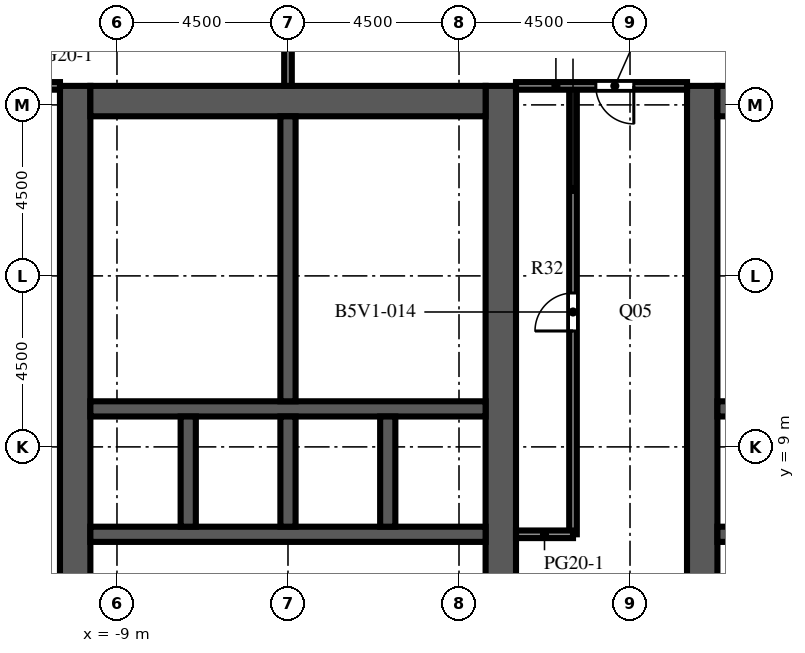
"""IFC4 building model, lengths in metres.
Left out: names, types, materials, properties, quantities, classifications, styles, units other than length and angle.
Written with IfcOpenShell. Run it as: python <this file> out.ifc"""

import sys

from ifc_helpers import new_model, si_unit, direction, frame, frame_2d, origin, place, context, subcontext, project, spatial, rectangle, extrude, element, fill, save


model = new_model("IFC4")
c1 = context("Model", 3, precision=1e-05, world=origin(), true_north=direction((0.0, 1.0)))
c2 = subcontext(c1, "Body", "Model", "MODEL_VIEW")
j1 = project(units=[si_unit("LENGTHUNIT", "METRE"), si_unit("PLANEANGLEUNIT", "RADIAN")], contexts=[c1])
p1 = place(None, origin())
s1 = spatial("IfcSite", under=j1, at=p1, CompositionType="ELEMENT")
p2 = place(p1, origin())
s2 = spatial("IfcBuilding", under=s1, at=p2, CompositionType="ELEMENT")
p3 = place(p2, frame((0.0, 0.0, 169.1)))
s3 = spatial("IfcBuildingStorey", under=s2, at=p3, CompositionType="ELEMENT", Elevation=169.1)
p4 = place(p3, frame((-10.1, -9.0, 0.0), z_axis=(0.0, 0.0, 1.0), x_axis=(0.0, 1.0, 0.0)))
e1 = element("IfcWall", 1, at=p4, inside=s3, PredefinedType="SHEAR", context=c2, shape_type="SweptSolid", body=[
    extrude(rectangle(XDim=27.5, YDim=0.8, at=frame_2d((13.75, 0.0))), origin(), (0.0, 0.0, 1.0), 4.1),
])
p5 = place(p4, frame((12.55, 0.0, 0.0)))
e2 = element("IfcOpeningElement", 2, at=p5, cuts=e1, PredefinedType="OPENING", context=c2, shape_type="SweptSolid", body=[
    extrude(rectangle(XDim=2.4, YDim=2.4, at=frame_2d((1.2, 1.2))), frame((0.0, 0.41, 0.0), z_axis=(0.0, -1.0, 0.0), x_axis=(1.0, 0.0, 0.0)), (0.0, 0.0, 1.0), 0.82),
])
p6 = place(p4, frame((6.825, 0.0, 0.0)))
e3 = element("IfcOpeningElement", 3, at=p6, cuts=e1, PredefinedType="OPENING", context=c2, shape_type="SweptSolid", body=[
    extrude(rectangle(XDim=1.2, YDim=2.1, at=frame_2d((0.6, 1.05))), frame((0.0, 0.41, 0.0), z_axis=(0.0, -1.0, 0.0), x_axis=(1.0, 0.0, 0.0)), (0.0, 0.0, 1.0), 0.82),
])
p7 = place(p4, frame((19.475, 0.0, 0.0)))
e4 = element("IfcOpeningElement", 4, at=p7, cuts=e1, PredefinedType="OPENING", context=c2, shape_type="SweptSolid", body=[
    extrude(rectangle(XDim=1.2, YDim=2.1, at=frame_2d((0.6, 1.05))), frame((0.0, 0.41, 0.0), z_axis=(0.0, -1.0, 0.0), x_axis=(1.0, 0.0, 0.0)), (0.0, 0.0, 1.0), 0.82),
])
p8 = place(p3, frame((1.1, -9.0, 0.0), z_axis=(0.0, 0.0, 1.0), x_axis=(0.0, 1.0, 0.0)))
e5 = element("IfcWall", 5, at=p8, inside=s3, PredefinedType="SHEAR", context=c2, shape_type="SweptSolid", body=[
    extrude(rectangle(XDim=27.5, YDim=0.8, at=frame_2d((13.75, 0.0))), origin(), (0.0, 0.0, 1.0), 4.1),
])
p9 = place(p8, frame((12.55, 0.0, 0.0)))
e6 = element("IfcOpeningElement", 6, at=p9, cuts=e5, PredefinedType="OPENING", context=c2, shape_type="SweptSolid", body=[
    extrude(rectangle(XDim=2.4, YDim=2.4, at=frame_2d((1.2, 1.2))), frame((0.0, 0.41, 0.0), z_axis=(0.0, -1.0, 0.0), x_axis=(1.0, 0.0, 0.0)), (0.0, 0.0, 1.0), 0.82),
])
p10 = place(p8, frame((3.95, 0.0, 0.0)))
e7 = element("IfcOpeningElement", 7, at=p10, cuts=e5, PredefinedType="OPENING", context=c2, shape_type="SweptSolid", body=[
    extrude(rectangle(XDim=1.2, YDim=2.1, at=frame_2d((0.6, 1.05))), frame((0.0, 0.41, 0.0), z_axis=(0.0, -1.0, 0.0), x_axis=(1.0, 0.0, 0.0)), (0.0, 0.0, 1.0), 0.82),
])
p11 = place(p8, frame((22.35, 0.0, 0.0)))
e8 = element("IfcOpeningElement", 8, at=p11, cuts=e5, PredefinedType="OPENING", context=c2, shape_type="SweptSolid", body=[
    extrude(rectangle(XDim=1.2, YDim=2.1, at=frame_2d((0.6, 1.05))), frame((0.0, 0.41, 0.0), z_axis=(0.0, -1.0, 0.0), x_axis=(1.0, 0.0, 0.0)), (0.0, 0.0, 1.0), 0.82),
])
p12 = place(p3, frame((-9.7, 18.1, 0.0), z_axis=(0.0, 0.0, 1.0), x_axis=(1.0, 0.0, 0.0)))
e9 = element("IfcWall", 9, at=p12, inside=s3, PredefinedType="SHEAR", context=c2, shape_type="SweptSolid", body=[
    extrude(rectangle(XDim=10.4, YDim=0.8, at=frame_2d((5.2, 0.0))), origin(), (0.0, 0.0, 1.0), 4.1),
])
p13 = place(p3, frame((-9.7, 6.7, 0.0), z_axis=(0.0, 0.0, 1.0), x_axis=(1.0, 0.0, 0.0)))
e10 = element("IfcWall", 10, at=p13, inside=s3, PredefinedType="SHEAR", context=c2, shape_type="SweptSolid", body=[
    extrude(rectangle(XDim=10.4, YDim=0.4, at=frame_2d((5.2, 0.0))), origin(), (0.0, 0.0, 1.0), 4.1),
])
p14 = place(p13, frame((3.337, 0.0, 0.0)))
e11 = element("IfcOpeningElement", 11, at=p14, cuts=e10, PredefinedType="OPENING", context=c2, shape_type="SweptSolid", body=[
    extrude(rectangle(XDim=1.1, YDim=2.1, at=frame_2d((0.55, 1.05))), frame((0.0, 0.21, 0.0), z_axis=(0.0, -1.0, 0.0), x_axis=(1.0, 0.0, 0.0)), (0.0, 0.0, 1.0), 0.42),
])
p15 = place(p13, frame((5.962, 0.0, 0.0)))
e12 = element("IfcOpeningElement", 12, at=p15, cuts=e10, PredefinedType="OPENING", context=c2, shape_type="SweptSolid", body=[
    extrude(rectangle(XDim=1.1, YDim=2.1, at=frame_2d((0.55, 1.05))), frame((0.0, 0.21, 0.0), z_axis=(0.0, -1.0, 0.0), x_axis=(1.0, 0.0, 0.0)), (0.0, 0.0, 1.0), 0.42),
])
p16 = place(p13, frame((8.663, 0.0, 0.0)))
e13 = element("IfcOpeningElement", 13, at=p16, cuts=e10, PredefinedType="OPENING", context=c2, shape_type="SweptSolid", body=[
    extrude(rectangle(XDim=1.1, YDim=2.1, at=frame_2d((0.55, 1.05))), frame((0.0, 0.21, 0.0), z_axis=(0.0, -1.0, 0.0), x_axis=(1.0, 0.0, 0.0)), (0.0, 0.0, 1.0), 0.42),
])
p17 = place(p13, frame((0.688, 0.0, 0.0)))
e14 = element("IfcOpeningElement", 14, at=p17, cuts=e10, PredefinedType="OPENING", context=c2, shape_type="SweptSolid", body=[
    extrude(rectangle(XDim=1.0, YDim=2.1, at=frame_2d((0.5, 1.05))), frame((0.0, 0.21, 0.0), z_axis=(0.0, -1.0, 0.0), x_axis=(1.0, 0.0, 0.0)), (0.0, 0.0, 1.0), 0.42),
])
p18 = place(p3, frame((-9.7, 10.0, 0.0), z_axis=(0.0, 0.0, 1.0), x_axis=(1.0, 0.0, 0.0)))
e15 = element("IfcWall", 15, at=p18, inside=s3, PredefinedType="SHEAR", context=c2, shape_type="SweptSolid", body=[
    extrude(rectangle(XDim=10.4, YDim=0.4, at=frame_2d((5.2, 0.0))), origin(), (0.0, 0.0, 1.0), 4.1),
])
for number, where, z_axis, x_axis in (
    (16, (-7.125, 6.9, 0.0), (0.0, 0.0, 1.0), (0.0, 1.0, 0.0)),
    (17, (-4.5, 6.9, 0.0), (0.0, 0.0, 1.0), (0.0, 1.0, 0.0)),
    (18, (-1.875, 6.9, 0.0), (0.0, 0.0, 1.0), (0.0, 1.0, 0.0)),
):
    element("IfcWall", number, at=place(p3, frame(where, z_axis=z_axis, x_axis=x_axis)), inside=s3, PredefinedType="SHEAR", context=c2, shape_type="SweptSolid", body=[
        extrude(rectangle(XDim=2.9, YDim=0.4, at=frame_2d((1.45, 0.0))), origin(), (0.0, 0.0, 1.0), 4.1),
    ])
p19 = place(p3, frame((-4.5, 10.2, 0.0), z_axis=(0.0, 0.0, 1.0), x_axis=(0.0, 1.0, 0.0)))
e19 = element("IfcWall", 19, at=p19, inside=s3, PredefinedType="SHEAR", context=c2, shape_type="SweptSolid", body=[
    extrude(rectangle(XDim=7.5, YDim=0.4, at=frame_2d((3.75, 0.0))), origin(), (0.0, 0.0, 1.0), 4.1),
])
p20 = place(p3, frame((6.4, -9.0, 0.0), z_axis=(0.0, 0.0, 1.0), x_axis=(0.0, 1.0, 0.0)))
e20 = element("IfcWall", 20, at=p20, inside=s3, PredefinedType="SHEAR", context=c2, shape_type="SweptSolid", body=[
    extrude(rectangle(XDim=27.5, YDim=0.8, at=frame_2d((13.75, 0.0))), origin(), (0.0, 0.0, 1.0), 4.1),
])
p21 = place(p20, frame((12.55, 0.0, 0.0)))
e21 = element("IfcOpeningElement", 21, at=p21, cuts=e20, PredefinedType="OPENING", context=c2, shape_type="SweptSolid", body=[
    extrude(rectangle(XDim=2.4, YDim=2.4, at=frame_2d((1.2, 1.2))), frame((0.0, 0.41, 0.0), z_axis=(0.0, -1.0, 0.0), x_axis=(1.0, 0.0, 0.0)), (0.0, 0.0, 1.0), 0.82),
])
p22 = place(p20, frame((3.95, 0.0, 0.0)))
e22 = element("IfcOpeningElement", 22, at=p22, cuts=e20, PredefinedType="OPENING", context=c2, shape_type="SweptSolid", body=[
    extrude(rectangle(XDim=1.2, YDim=2.1, at=frame_2d((0.6, 1.05))), frame((0.0, 0.41, 0.0), z_axis=(0.0, -1.0, 0.0), x_axis=(1.0, 0.0, 0.0)), (0.0, 0.0, 1.0), 0.82),
])
p23 = place(p20, frame((22.35, 0.0, 0.0)))
e23 = element("IfcOpeningElement", 23, at=p23, cuts=e20, PredefinedType="OPENING", context=c2, shape_type="SweptSolid", body=[
    extrude(rectangle(XDim=1.2, YDim=2.1, at=frame_2d((0.6, 1.05))), frame((0.0, 0.41, 0.0), z_axis=(0.0, -1.0, 0.0), x_axis=(1.0, 0.0, 0.0)), (0.0, 0.0, 1.0), 0.82),
])
p24 = place(p3, frame((6.8, 18.1, 0.0), z_axis=(0.0, 0.0, 1.0), x_axis=(1.0, 0.0, 0.0)))
e24 = element("IfcWall", 24, at=p24, inside=s3, PredefinedType="SHEAR", context=c2, shape_type="SweptSolid", body=[
    extrude(rectangle(XDim=10.4, YDim=0.8, at=frame_2d((5.2, 0.0))), origin(), (0.0, 0.0, 1.0), 4.1),
])
p25 = place(p3, frame((6.8, 6.7, 0.0), z_axis=(0.0, 0.0, 1.0), x_axis=(1.0, 0.0, 0.0)))
e25 = element("IfcWall", 25, at=p25, inside=s3, PredefinedType="SHEAR", context=c2, shape_type="SweptSolid", body=[
    extrude(rectangle(XDim=10.4, YDim=0.4, at=frame_2d((5.2, 0.0))), origin(), (0.0, 0.0, 1.0), 4.1),
])
p26 = place(p25, frame((3.337, 0.0, 0.0)))
e26 = element("IfcOpeningElement", 26, at=p26, cuts=e25, PredefinedType="OPENING", context=c2, shape_type="SweptSolid", body=[
    extrude(rectangle(XDim=1.1, YDim=2.1, at=frame_2d((0.55, 1.05))), frame((0.0, 0.21, 0.0), z_axis=(0.0, -1.0, 0.0), x_axis=(1.0, 0.0, 0.0)), (0.0, 0.0, 1.0), 0.42),
])
p27 = place(p25, frame((5.962, 0.0, 0.0)))
e27 = element("IfcOpeningElement", 27, at=p27, cuts=e25, PredefinedType="OPENING", context=c2, shape_type="SweptSolid", body=[
    extrude(rectangle(XDim=1.1, YDim=2.1, at=frame_2d((0.55, 1.05))), frame((0.0, 0.21, 0.0), z_axis=(0.0, -1.0, 0.0), x_axis=(1.0, 0.0, 0.0)), (0.0, 0.0, 1.0), 0.42),
])
p28 = place(p25, frame((8.663, 0.0, 0.0)))
e28 = element("IfcOpeningElement", 28, at=p28, cuts=e25, PredefinedType="OPENING", context=c2, shape_type="SweptSolid", body=[
    extrude(rectangle(XDim=1.1, YDim=2.1, at=frame_2d((0.55, 1.05))), frame((0.0, 0.21, 0.0), z_axis=(0.0, -1.0, 0.0), x_axis=(1.0, 0.0, 0.0)), (0.0, 0.0, 1.0), 0.42),
])
p29 = place(p25, frame((0.688, 0.0, 0.0)))
e29 = element("IfcOpeningElement", 29, at=p29, cuts=e25, PredefinedType="OPENING", context=c2, shape_type="SweptSolid", body=[
    extrude(rectangle(XDim=1.0, YDim=2.1, at=frame_2d((0.5, 1.05))), frame((0.0, 0.21, 0.0), z_axis=(0.0, -1.0, 0.0), x_axis=(1.0, 0.0, 0.0)), (0.0, 0.0, 1.0), 0.42),
])
p30 = place(p3, frame((6.8, 10.0, 0.0), z_axis=(0.0, 0.0, 1.0), x_axis=(1.0, 0.0, 0.0)))
e30 = element("IfcWall", 30, at=p30, inside=s3, PredefinedType="SHEAR", context=c2, shape_type="SweptSolid", body=[
    extrude(rectangle(XDim=10.4, YDim=0.4, at=frame_2d((5.2, 0.0))), origin(), (0.0, 0.0, 1.0), 4.1),
])
p31 = place(p3, frame((-0.7, 10.2, 0.0), z_axis=(0.0, 0.0, 1.0), x_axis=(0.0, 1.0, 0.0)))
e31 = element("IfcWall", 31, at=p31, inside=s3, PredefinedType="PARTITIONING", context=c2, shape_type="SweptSolid", body=[
    extrude(rectangle(XDim=2.25, YDim=0.1, at=frame_2d((1.125, 0.0))), origin(), (0.0, 0.0, 1.0), 3.65),
])
p32 = place(p31, frame((0.625, 0.0, 0.0)))
e32 = element("IfcOpeningElement", 32, at=p32, cuts=e31, PredefinedType="OPENING", context=c2, shape_type="SweptSolid", body=[
    extrude(rectangle(XDim=1.0, YDim=2.1, at=frame_2d((0.5, 1.05))), frame((0.0, 0.06, 0.0), z_axis=(0.0, -1.0, 0.0), x_axis=(1.0, 0.0, 0.0)), (0.0, 0.0, 1.0), 0.12),
])
p33 = place(p3, frame((-0.7, 12.45, 0.0), z_axis=(0.0, 0.0, 1.0), x_axis=(0.0, 1.0, 0.0)))
e33 = element("IfcWall", 33, at=p33, inside=s3, PredefinedType="PARTITIONING", context=c2, shape_type="SweptSolid", body=[
    extrude(rectangle(XDim=2.4, YDim=0.1, at=frame_2d((1.2, 0.0))), origin(), (0.0, 0.0, 1.0), 3.65),
])
p34 = place(p33, frame((0.7, 0.0, 0.0)))
e34 = element("IfcOpeningElement", 34, at=p34, cuts=e33, PredefinedType="OPENING", context=c2, shape_type="SweptSolid", body=[
    extrude(rectangle(XDim=1.0, YDim=2.1, at=frame_2d((0.5, 1.05))), frame((0.0, 0.06, 0.0), z_axis=(0.0, -1.0, 0.0), x_axis=(1.0, 0.0, 0.0)), (0.0, 0.0, 1.0), 0.12),
])
p35 = place(p3, frame((-0.7, 14.85, 0.0), z_axis=(0.0, 0.0, 1.0), x_axis=(0.0, 1.0, 0.0)))
e35 = element("IfcWall", 35, at=p35, inside=s3, PredefinedType="PARTITIONING", context=c2, shape_type="SweptSolid", body=[
    extrude(rectangle(XDim=2.85, YDim=0.1, at=frame_2d((1.425, 0.0))), origin(), (0.0, 0.0, 1.0), 3.65),
])
p36 = place(p35, frame((0.925, 0.0, 0.0)))
e36 = element("IfcOpeningElement", 36, at=p36, cuts=e35, PredefinedType="OPENING", context=c2, shape_type="SweptSolid", body=[
    extrude(rectangle(XDim=1.0, YDim=2.1, at=frame_2d((0.5, 1.05))), frame((0.0, 0.06, 0.0), z_axis=(0.0, -1.0, 0.0), x_axis=(1.0, 0.0, 0.0)), (0.0, 0.0, 1.0), 0.12),
])
for number, where, z_axis, x_axis in (
    (37, (-4.3, 12.45, 0.0), (0.0, 0.0, 1.0), (1.0, 0.0, 0.0)),
    (38, (-4.3, 14.85, 0.0), (0.0, 0.0, 1.0), (1.0, 0.0, 0.0)),
):
    element("IfcWall", number, at=place(p3, frame(where, z_axis=z_axis, x_axis=x_axis)), inside=s3, PredefinedType="PARTITIONING", context=c2, shape_type="SweptSolid", body=[
        extrude(rectangle(XDim=3.6, YDim=0.1, at=frame_2d((1.8, 0.0))), origin(), (0.0, 0.0, 1.0), 3.65),
    ])
p37 = place(p3, frame((-4.5, 18.5, 0.0), z_axis=(0.0, 0.0, 1.0), x_axis=(0.0, 1.0, 0.0)))
e39 = element("IfcWall", 39, at=p37, inside=s3, PredefinedType="PARTITIONING", context=c2, shape_type="SweptSolid", body=[
    extrude(rectangle(XDim=8.0, YDim=0.2, at=frame_2d((4.0, 0.0))), origin(), (0.0, 0.0, 1.0), 3.65),
])
p38 = place(p3, frame((3.0, 6.7, 0.0), z_axis=(0.0, 0.0, 1.0), x_axis=(0.0, 1.0, 0.0)))
e40 = element("IfcWall", 40, at=p38, inside=s3, PredefinedType="PARTITIONING", context=c2, shape_type="SweptSolid", body=[
    extrude(rectangle(XDim=11.8, YDim=0.2, at=frame_2d((5.9, 0.0))), origin(), (0.0, 0.0, 1.0), 3.65),
])
p39 = place(p38, frame((5.35, 0.0, 0.0)))
e41 = element("IfcOpeningElement", 41, at=p39, cuts=e40, PredefinedType="OPENING", context=c2, shape_type="SweptSolid", body=[
    extrude(rectangle(XDim=1.0, YDim=2.1, at=frame_2d((0.5, 1.05))), frame((0.0, 0.11, 0.0), z_axis=(0.0, -1.0, 0.0), x_axis=(1.0, 0.0, 0.0)), (0.0, 0.0, 1.0), 0.22),
])
p40 = place(p3, frame((1.5, 6.7, 0.0), z_axis=(0.0, 0.0, 1.0), x_axis=(1.0, 0.0, 0.0)))
e42 = element("IfcWall", 42, at=p40, inside=s3, PredefinedType="PARTITIONING", context=c2, shape_type="SweptSolid", body=[
    extrude(rectangle(XDim=1.5, YDim=0.2, at=frame_2d((0.75, 0.0))), origin(), (0.0, 0.0, 1.0), 3.65),
])
p41 = place(p3, frame((-13.5, 18.5, 0.0), z_axis=(0.0, 0.0, 1.0), x_axis=(1.0, 0.0, 0.0)))
e43 = element("IfcWall", 43, at=p41, inside=s3, PredefinedType="PARTITIONING", context=c2, shape_type="SweptSolid", body=[
    extrude(rectangle(XDim=3.0, YDim=0.2, at=frame_2d((1.5, 0.0))), origin(), (0.0, 0.0, 1.0), 3.65),
])
p42 = place(p41, frame((0.6, 0.0, 0.0)))
e44 = element("IfcOpeningElement", 44, at=p42, cuts=e43, PredefinedType="OPENING", context=c2, shape_type="SweptSolid", body=[
    extrude(rectangle(XDim=1.0, YDim=2.1, at=frame_2d((0.5, 1.05))), frame((0.0, 0.11, 0.0), z_axis=(0.0, -1.0, 0.0), x_axis=(1.0, 0.0, 0.0)), (0.0, 0.0, 1.0), 0.22),
])
p43 = place(p3, frame((1.5, 18.5, 0.0), z_axis=(0.0, 0.0, 1.0), x_axis=(1.0, 0.0, 0.0)))
e45 = element("IfcWall", 45, at=p43, inside=s3, PredefinedType="PARTITIONING", context=c2, shape_type="SweptSolid", body=[
    extrude(rectangle(XDim=4.5, YDim=0.2, at=frame_2d((2.25, 0.0))), origin(), (0.0, 0.0, 1.0), 3.65),
])
p44 = place(p43, frame((2.1, 0.0, 0.0)))
e46 = element("IfcOpeningElement", 46, at=p44, cuts=e45, PredefinedType="OPENING", context=c2, shape_type="SweptSolid", body=[
    extrude(rectangle(XDim=1.0, YDim=2.1, at=frame_2d((0.5, 1.05))), frame((0.0, 0.11, 0.0), z_axis=(0.0, -1.0, 0.0), x_axis=(1.0, 0.0, 0.0)), (0.0, 0.0, 1.0), 0.22),
])
p45 = place(p14, origin())
e47 = element("IfcDoor", 47, at=p45, inside=s3, OperationType="DOUBLE_DOOR_SLIDING", PredefinedType="DOOR", context=c2, shape_type="SweptSolid", body=[
    extrude(rectangle(XDim=1.1, YDim=2.1, at=frame_2d((0.55, 1.05))), frame((0.0, 0.025, 0.0), z_axis=(0.0, -1.0, 0.0), x_axis=(1.0, 0.0, 0.0)), (0.0, 0.0, 1.0), 0.05),
])
fill(e11, e47)
p46 = place(p15, origin())
e48 = element("IfcDoor", 48, at=p46, inside=s3, OperationType="DOUBLE_DOOR_SLIDING", PredefinedType="DOOR", context=c2, shape_type="SweptSolid", body=[
    extrude(rectangle(XDim=1.1, YDim=2.1, at=frame_2d((0.55, 1.05))), frame((0.0, 0.025, 0.0), z_axis=(0.0, -1.0, 0.0), x_axis=(1.0, 0.0, 0.0)), (0.0, 0.0, 1.0), 0.05),
])
fill(e12, e48)
p47 = place(p16, origin())
e49 = element("IfcDoor", 49, at=p47, inside=s3, OperationType="DOUBLE_DOOR_SLIDING", PredefinedType="DOOR", context=c2, shape_type="SweptSolid", body=[
    extrude(rectangle(XDim=1.1, YDim=2.1, at=frame_2d((0.55, 1.05))), frame((0.0, 0.025, 0.0), z_axis=(0.0, -1.0, 0.0), x_axis=(1.0, 0.0, 0.0)), (0.0, 0.0, 1.0), 0.05),
])
fill(e13, e49)
p48 = place(p5, origin())
e50 = element("IfcDoor", 50, at=p48, inside=s3, OperationType="DOUBLE_DOOR_DOUBLE_SWING", PredefinedType="DOOR", context=c2, shape_type="SweptSolid", body=[
    extrude(rectangle(XDim=2.4, YDim=2.4, at=frame_2d((1.2, 1.2))), frame((0.0, 0.025, 0.0), z_axis=(0.0, -1.0, 0.0), x_axis=(1.0, 0.0, 0.0)), (0.0, 0.0, 1.0), 0.05),
])
fill(e2, e50)
p49 = place(p9, origin())
e51 = element("IfcDoor", 51, at=p49, inside=s3, OperationType="DOUBLE_DOOR_DOUBLE_SWING", PredefinedType="DOOR", context=c2, shape_type="SweptSolid", body=[
    extrude(rectangle(XDim=2.4, YDim=2.4, at=frame_2d((1.2, 1.2))), frame((0.0, 0.025, 0.0), z_axis=(0.0, -1.0, 0.0), x_axis=(1.0, 0.0, 0.0)), (0.0, 0.0, 1.0), 0.05),
])
fill(e6, e51)
p50 = place(p21, origin())
e52 = element("IfcDoor", 52, at=p50, inside=s3, OperationType="DOUBLE_DOOR_DOUBLE_SWING", PredefinedType="DOOR", context=c2, shape_type="SweptSolid", body=[
    extrude(rectangle(XDim=2.4, YDim=2.4, at=frame_2d((1.2, 1.2))), frame((0.0, 0.025, 0.0), z_axis=(0.0, -1.0, 0.0), x_axis=(1.0, 0.0, 0.0)), (0.0, 0.0, 1.0), 0.05),
])
fill(e21, e52)
p51 = place(p7, origin())
e53 = element("IfcDoor", 53, at=p51, inside=s3, OperationType="SINGLE_SWING_LEFT", PredefinedType="DOOR", context=c2, shape_type="SweptSolid", body=[
    extrude(rectangle(XDim=1.2, YDim=2.1, at=frame_2d((0.6, 1.05))), frame((0.0, 0.025, 0.0), z_axis=(0.0, -1.0, 0.0), x_axis=(1.0, 0.0, 0.0)), (0.0, 0.0, 1.0), 0.05),
])
fill(e4, e53)
p52 = place(p17, origin())
e54 = element("IfcDoor", 54, at=p52, inside=s3, OperationType="SINGLE_SWING_LEFT", PredefinedType="DOOR", context=c2, shape_type="SweptSolid", body=[
    extrude(rectangle(XDim=1.0, YDim=2.1, at=frame_2d((0.5, 1.05))), frame((0.0, 0.025, 0.0), z_axis=(0.0, -1.0, 0.0), x_axis=(1.0, 0.0, 0.0)), (0.0, 0.0, 1.0), 0.05),
])
fill(e14, e54)
p53 = place(p11, origin())
e55 = element("IfcDoor", 55, at=p53, inside=s3, OperationType="SINGLE_SWING_LEFT", PredefinedType="DOOR", context=c2, shape_type="SweptSolid", body=[
    extrude(rectangle(XDim=1.2, YDim=2.1, at=frame_2d((0.6, 1.05))), frame((0.0, 0.375, 0.0), z_axis=(0.0, -1.0, 0.0), x_axis=(1.0, 0.0, 0.0)), (0.0, 0.0, 1.0), 0.05),
])
fill(e8, e55)
p54 = place(p32, origin())
e56 = element("IfcDoor", 56, at=p54, inside=s3, OperationType="SINGLE_SWING_RIGHT", PredefinedType="DOOR", context=c2, shape_type="SweptSolid", body=[
    extrude(rectangle(XDim=1.0, YDim=2.1, at=frame_2d((0.5, 1.05))), frame((0.0, 0.025, 0.0), z_axis=(0.0, -1.0, 0.0), x_axis=(1.0, 0.0, 0.0)), (0.0, 0.0, 1.0), 0.05),
])
fill(e32, e56)
p55 = place(p34, origin())
e57 = element("IfcDoor", 57, at=p55, inside=s3, OperationType="SINGLE_SWING_LEFT", PredefinedType="DOOR", context=c2, shape_type="SweptSolid", body=[
    extrude(rectangle(XDim=1.0, YDim=2.1, at=frame_2d((0.5, 1.05))), frame((0.0, 0.025, 0.0), z_axis=(0.0, -1.0, 0.0), x_axis=(1.0, 0.0, 0.0)), (0.0, 0.0, 1.0), 0.05),
])
fill(e34, e57)
p56 = place(p36, origin())
e58 = element("IfcDoor", 58, at=p56, inside=s3, OperationType="SINGLE_SWING_RIGHT", PredefinedType="DOOR", context=c2, shape_type="SweptSolid", body=[
    extrude(rectangle(XDim=1.0, YDim=2.1, at=frame_2d((0.5, 1.05))), frame((0.0, 0.025, 0.0), z_axis=(0.0, -1.0, 0.0), x_axis=(1.0, 0.0, 0.0)), (0.0, 0.0, 1.0), 0.05),
])
fill(e36, e58)
p57 = place(p23, origin())
e59 = element("IfcDoor", 59, at=p57, inside=s3, OperationType="SINGLE_SWING_RIGHT", PredefinedType="DOOR", context=c2, shape_type="SweptSolid", body=[
    extrude(rectangle(XDim=1.2, YDim=2.1, at=frame_2d((0.6, 1.05))), frame((0.0, -0.325, 0.0), z_axis=(0.0, -1.0, 0.0), x_axis=(1.0, 0.0, 0.0)), (0.0, 0.0, 1.0), 0.05),
])
fill(e23, e59)
p58 = place(p39, origin())
e60 = element("IfcDoor", 60, at=p58, inside=s3, OperationType="SINGLE_SWING_LEFT", PredefinedType="DOOR", context=c2, shape_type="SweptSolid", body=[
    extrude(rectangle(XDim=1.0, YDim=2.1, at=frame_2d((0.5, 1.05))), frame((0.0, 0.025, 0.0), z_axis=(0.0, -1.0, 0.0), x_axis=(1.0, 0.0, 0.0)), (0.0, 0.0, 1.0), 0.05),
])
fill(e41, e60)
p59 = place(p44, origin())
e61 = element("IfcDoor", 61, at=p59, inside=s3, OperationType="SINGLE_SWING_RIGHT", PredefinedType="DOOR", context=c2, shape_type="SweptSolid", body=[
    extrude(rectangle(XDim=1.0, YDim=2.1, at=frame_2d((0.5, 1.05))), frame((0.0, 0.025, 0.0), z_axis=(0.0, -1.0, 0.0), x_axis=(1.0, 0.0, 0.0)), (0.0, 0.0, 1.0), 0.05),
])
fill(e46, e61)
save(model, sys.argv[1])
